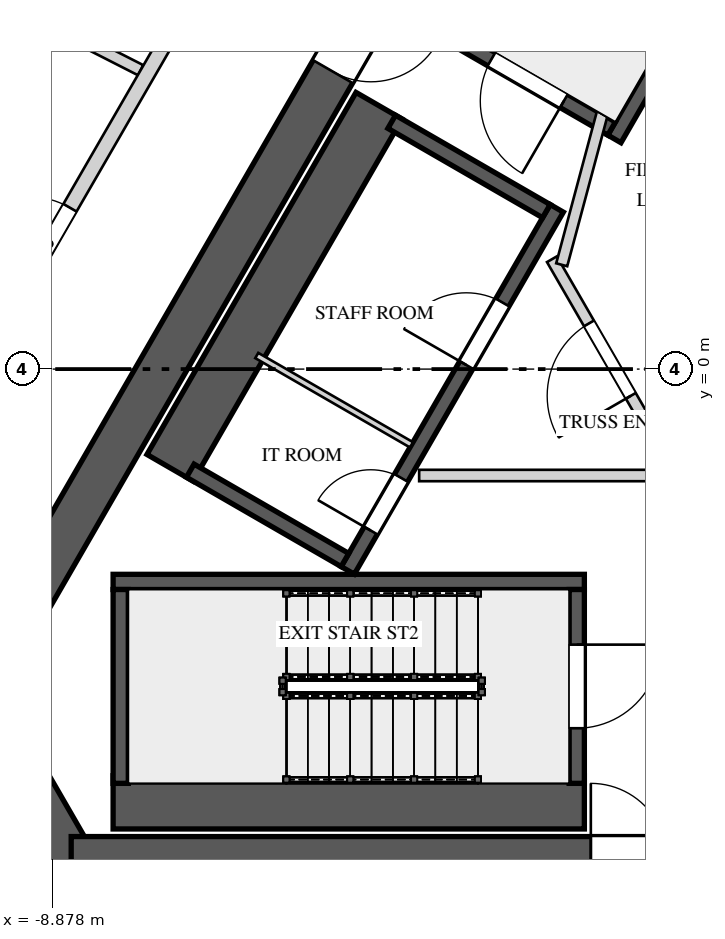
"""IFC4 building model, lengths in metres.
Left out: names, types, materials, properties, quantities, classifications, styles, units other than length and angle.
Written with IfcOpenShell. Run it as: python <this file> out.ifc"""

import sys

from ifc_helpers import new_model, si_unit, direction, frame, frame_2d, origin, place, context, subcontext, project, spatial, rectangle, extrude, element, fill, save


model = new_model("IFC4")
c1 = context("Model", 3, precision=1e-05, world=origin(), true_north=direction((0.0, 1.0)))
c2 = subcontext(c1, "Body", "Model", "MODEL_VIEW")
j1 = project(units=[si_unit("LENGTHUNIT", "METRE"), si_unit("PLANEANGLEUNIT", "RADIAN")], contexts=[c1])
p1 = place(None, origin())
s1 = spatial("IfcSite", under=j1, at=p1, CompositionType="ELEMENT")
p2 = place(p1, origin())
s2 = spatial("IfcBuilding", under=s1, at=p2, CompositionType="ELEMENT")
p3 = place(p2, frame((0.0, 0.0, 306.4)))
s3 = spatial("IfcBuildingStorey", under=s2, at=p3, CompositionType="ELEMENT", Elevation=306.4)
p4 = place(p3, frame((-1.27, 10.7, 0.0), z_axis=(0.0, 0.0, 1.0), x_axis=(-0.499999536116, -0.866025671608, 0.0)))
e1 = element("IfcWall", 1, at=p4, inside=s3, PredefinedType="SHEAR", context=c2, shape_type="SweptSolid", body=[
    extrude(rectangle(XDim=17.263, YDim=0.6, at=frame_2d((8.631, 0.0))), origin(), (0.0, 0.0, 1.0), 14.0),
])
p5 = place(p4, frame((6.836, 0.0, 0.0)))
e2 = element("IfcOpeningElement", 2, at=p5, cuts=e1, PredefinedType="OPENING", context=c2, shape_type="SweptSolid", body=[
    extrude(rectangle(XDim=1.0, YDim=2.4, at=frame_2d((0.5, 1.2))), frame((0.0, 0.31, 0.0), z_axis=(0.0, -1.0, 0.0), x_axis=(1.0, 0.0, 0.0)), (0.0, 0.0, 1.0), 0.62),
])
p6 = place(p3, frame((-9.988, -4.1, 0.0), z_axis=(0.0, 0.0, 1.0), x_axis=(0.499995765644, -0.866027848477, 0.0)))
e3 = element("IfcWall", 3, at=p6, inside=s3, PredefinedType="SHEAR", context=c2, shape_type="SweptSolid", body=[
    extrude(rectangle(XDim=2.887, YDim=0.6, at=frame_2d((1.443, 0.0))), origin(), (0.0, 0.0, 1.0), 14.0),
])
p7 = place(p3, frame((-8.631, -6.45, 0.0), z_axis=(0.0, 0.0, 1.0), x_axis=(1.0, 0.0, 0.0)))
e4 = element("IfcWall", 4, at=p7, inside=s3, PredefinedType="SHEAR", context=c2, shape_type="SweptSolid", body=[
    extrude(rectangle(XDim=17.263, YDim=0.6, at=frame_2d((8.631, 0.0))), origin(), (0.0, 0.0, 1.0), 14.0),
])
p8 = place(p7, frame((6.836, 0.0, 0.0)))
e5 = element("IfcOpeningElement", 5, at=p8, cuts=e4, PredefinedType="OPENING", context=c2, shape_type="SweptSolid", body=[
    extrude(rectangle(XDim=1.0, YDim=2.4, at=frame_2d((0.5, 1.2))), frame((0.0, 0.31, 0.0), z_axis=(0.0, -1.0, 0.0), x_axis=(1.0, 0.0, 0.0)), (0.0, 0.0, 1.0), 0.62),
])
p9 = place(p7, frame((15.034, 0.0, 0.0)))
e6 = element("IfcOpeningElement", 6, at=p9, cuts=e4, PredefinedType="OPENING", context=c2, shape_type="SweptSolid", body=[
    extrude(rectangle(XDim=0.8, YDim=2.1, at=frame_2d((0.4, 1.05))), frame((0.0, 0.31, 0.0), z_axis=(0.0, -1.0, 0.0), x_axis=(1.0, 0.0, 0.0)), (0.0, 0.0, 1.0), 0.62),
])
p10 = place(p3, frame((1.615, 8.397, 0.0), z_axis=(0.0, 0.0, 1.0), x_axis=(-0.500009909098, -0.866019682689, 0.0)))
e7 = element("IfcWall", 7, at=p10, inside=s3, PredefinedType="SOLIDWALL", context=c2, shape_type="SweptSolid", body=[
    extrude(rectangle(XDim=6.2, YDim=0.2, at=frame_2d((3.1, 0.0))), origin(), (0.0, 0.0, 1.0), 13.65),
])
p11 = place(p3, frame((-1.521, 3.165, 0.0), z_axis=(0.0, 0.0, 1.0), x_axis=(-0.866030925526, 0.499990435942, 0.0)))
e8 = element("IfcWall", 8, at=p11, inside=s3, PredefinedType="SOLIDWALL", context=c2, shape_type="SweptSolid", body=[
    extrude(rectangle(XDim=2.55, YDim=0.2, at=frame_2d((1.275, 0.0))), origin(), (0.0, 0.0, 1.0), 13.65),
])
p12 = place(p11, frame((0.725, 0.0, 0.0)))
e9 = element("IfcOpeningElement", 9, at=p12, cuts=e8, PredefinedType="OPENING", context=c2, shape_type="SweptSolid", body=[
    extrude(rectangle(XDim=1.1, YDim=2.4, at=frame_2d((0.55, 1.2))), frame((0.0, 0.11, 0.0), z_axis=(0.0, -1.0, 0.0), x_axis=(1.0, 0.0, 0.0)), (0.0, 0.0, 1.0), 0.22),
])
p13 = place(p3, frame((-8.08, -5.7, 0.0), z_axis=(0.0, 0.0, 1.0), x_axis=(1.0, 0.0, 0.0)))
e10 = element("IfcWall", 10, at=p13, inside=s3, PredefinedType="SOLIDWALL", context=c2, shape_type="SweptSolid", body=[
    extrude(rectangle(XDim=6.2, YDim=0.7, at=frame_2d((3.1, 0.0))), origin(), (0.0, 0.0, 1.0), 13.65),
])
p14 = place(p3, frame((-8.08, -2.8, 0.0), z_axis=(0.0, 0.0, 1.0), x_axis=(1.0, 0.0, 0.0)))
e11 = element("IfcWall", 11, at=p14, inside=s3, PredefinedType="SOLIDWALL", context=c2, shape_type="SweptSolid", body=[
    extrude(rectangle(XDim=6.2, YDim=0.2, at=frame_2d((3.1, 0.0))), origin(), (0.0, 0.0, 1.0), 13.65),
])
p15 = place(p3, frame((-7.98, -2.9, 0.0), z_axis=(0.0, 0.0, 1.0), x_axis=(0.0, -1.0, 0.0)))
e12 = element("IfcWall", 12, at=p15, inside=s3, PredefinedType="SOLIDWALL", context=c2, shape_type="SweptSolid", body=[
    extrude(rectangle(XDim=2.55, YDim=0.2, at=frame_2d((1.275, 0.0))), origin(), (0.0, 0.0, 1.0), 13.65),
])
p16 = place(p3, frame((-1.98, -2.9, 0.0), z_axis=(0.0, 0.0, 1.0), x_axis=(0.0, -1.0, 0.0)))
e13 = element("IfcWall", 13, at=p16, inside=s3, PredefinedType="SOLIDWALL", context=c2, shape_type="SweptSolid", body=[
    extrude(rectangle(XDim=2.55, YDim=0.2, at=frame_2d((1.275, 0.0))), origin(), (0.0, 0.0, 1.0), 13.65),
])
p17 = place(p16, frame((0.725, 0.0, 0.0)))
e14 = element("IfcOpeningElement", 14, at=p17, cuts=e13, PredefinedType="OPENING", context=c2, shape_type="SweptSolid", body=[
    extrude(rectangle(XDim=1.1, YDim=2.4, at=frame_2d((0.55, 1.2))), frame((0.0, 0.11, 0.0), z_axis=(0.0, -1.0, 0.0), x_axis=(1.0, 0.0, 0.0)), (0.0, 0.0, 1.0), 0.22),
])
p18 = place(p3, frame((-4.993, -2.648, 0.0), z_axis=(0.0, 0.0, 1.0), x_axis=(0.499996545922, 0.866027397988, 0.0)))
e15 = element("IfcWall", 15, at=p18, inside=s3, PredefinedType="SOLIDWALL", context=c2, shape_type="SweptSolid", body=[
    extrude(rectangle(XDim=5.5, YDim=0.2, at=frame_2d((2.75, 0.0))), origin(), (0.0, 0.0, 1.0), 13.65),
])
p19 = place(p18, frame((3.12, 0.0, 0.0)))
e16 = element("IfcOpeningElement", 16, at=p19, cuts=e15, PredefinedType="OPENING", context=c2, shape_type="SweptSolid", body=[
    extrude(rectangle(XDim=0.95, YDim=2.4, at=frame_2d((0.475, 1.2))), frame((0.0, 0.11, 0.0), z_axis=(0.0, -1.0, 0.0), x_axis=(1.0, 0.0, 0.0)), (0.0, 0.0, 1.0), 0.22),
])
p20 = place(p18, frame((0.605, 0.0, 0.0)))
e17 = element("IfcOpeningElement", 17, at=p20, cuts=e15, PredefinedType="OPENING", context=c2, shape_type="SweptSolid", body=[
    extrude(rectangle(XDim=0.8, YDim=2.1, at=frame_2d((0.4, 1.05))), frame((0.0, 0.11, 0.0), z_axis=(0.0, -1.0, 0.0), x_axis=(1.0, 0.0, 0.0)), (0.0, 0.0, 1.0), 0.22),
])
p21 = place(p3, frame((-4.581, 3.465, 0.0), z_axis=(0.0, 0.0, 1.0), x_axis=(-0.499996545922, -0.866027397988, 0.0)))
e18 = element("IfcWall", 18, at=p21, inside=s3, PredefinedType="SOLIDWALL", context=c2, shape_type="SweptSolid", body=[
    extrude(rectangle(XDim=5.5, YDim=0.7, at=frame_2d((2.75, 0.0))), origin(), (0.0, 0.0, 1.0), 13.65),
])
p22 = place(p3, frame((-2.38, 2.078, 0.0), z_axis=(0.0, 0.0, 1.0), x_axis=(-0.866061024631, 0.499938297808, 0.0)))
e19 = element("IfcWall", 19, at=p22, inside=s3, PredefinedType="SOLIDWALL", context=c2, shape_type="SweptSolid", body=[
    extrude(rectangle(XDim=2.35, YDim=0.2, at=frame_2d((1.175, 0.0))), origin(), (0.0, 0.0, 1.0), 13.65),
])
p23 = place(p3, frame((-5.03, -2.512, 0.0), z_axis=(0.0, 0.0, 1.0), x_axis=(-0.866016039709, 0.500016218704, 0.0)))
e20 = element("IfcWall", 20, at=p23, inside=s3, PredefinedType="SOLIDWALL", context=c2, shape_type="SweptSolid", body=[
    extrude(rectangle(XDim=2.35, YDim=0.2, at=frame_2d((1.175, 0.0))), origin(), (0.0, 0.0, 1.0), 13.65),
])
p24 = place(p3, frame((-4.155, -0.996, 0.0), z_axis=(0.0, 0.0, 1.0), x_axis=(-0.866016039709, 0.500016218704, 0.0)))
e21 = element("IfcWall", 21, at=p24, inside=s3, PredefinedType="PARTITIONING", context=c2, shape_type="SweptSolid", body=[
    extrude(rectangle(XDim=2.35, YDim=0.08, at=frame_2d((1.175, 0.0))), origin(), (0.0, 0.0, 1.0), 13.65),
])
p25 = place(p3, frame((-0.744, -1.261, 0.0), z_axis=(0.0, 0.0, 1.0), x_axis=(-0.500004234368, 0.866022959057, 0.0)))
e22 = element("IfcWall", 22, at=p25, inside=s3, PredefinedType="PARTITIONING", context=c2, shape_type="SweptSolid", body=[
    extrude(rectangle(XDim=3.125, YDim=0.15, at=frame_2d((1.562, 0.0))), origin(), (0.0, 0.0, 1.0), 13.65),
])
p26 = place(p25, frame((1.05, 0.0, 0.0)))
e23 = element("IfcOpeningElement", 23, at=p26, cuts=e22, PredefinedType="OPENING", context=c2, shape_type="SweptSolid", body=[
    extrude(rectangle(XDim=1.1, YDim=2.4, at=frame_2d((0.55, 1.2))), frame((0.0, 0.085, 0.0), z_axis=(0.0, -1.0, 0.0), x_axis=(1.0, 0.0, 0.0)), (0.0, 0.0, 1.0), 0.17),
])
p27 = place(p3, frame((-2.178, 1.372, 0.0), z_axis=(0.0, 0.0, 1.0), x_axis=(0.258808958833, 0.96592852884, 0.0)))
e24 = element("IfcWall", 24, at=p27, inside=s3, PredefinedType="PARTITIONING", context=c2, shape_type="SweptSolid", body=[
    extrude(rectangle(XDim=2.903, YDim=0.15, at=frame_2d((1.451, 0.0))), origin(), (0.0, 0.0, 1.0), 13.65),
])
p28 = place(p3, frame((-1.51, 4.215, 0.0), z_axis=(0.0, 0.0, 1.0), x_axis=(0.866085525409, 0.49989585183, 0.0)))
e25 = element("IfcWall", 25, at=p28, inside=s3, PredefinedType="PARTITIONING", context=c2, shape_type="SweptSolid", body=[
    extrude(rectangle(XDim=1.3, YDim=0.15, at=frame_2d((0.65, 0.0))), origin(), (0.0, 0.0, 1.0), 13.65),
])
p29 = place(p3, frame((-4.053, -1.4, 0.0), z_axis=(0.0, 0.0, 1.0), x_axis=(1.0, 0.0, 0.0)))
e26 = element("IfcWall", 26, at=p29, inside=s3, PredefinedType="PARTITIONING", context=c2, shape_type="SweptSolid", body=[
    extrude(rectangle(XDim=7.876, YDim=0.15, at=frame_2d((3.938, 0.0))), origin(), (0.0, 0.0, 1.0), 13.65),
])
p30 = place(p3, frame((-7.718, 3.932, 0.0), z_axis=(0.0, 0.0, 1.0), x_axis=(-0.891006469539, 0.453990606995, 0.0)))
e27 = element("IfcWall", 27, at=p30, inside=s3, PredefinedType="PARTITIONING", context=c2, shape_type="SweptSolid", body=[
    extrude(rectangle(XDim=8.011, YDim=0.15, at=frame_2d((4.005, 0.0))), origin(), (0.0, 0.0, 1.0), 13.65),
])
p31 = place(p3, frame((-9.819, 0.094, 0.0), z_axis=(0.0, 0.0, 1.0), x_axis=(0.499971228071, 0.866042014628, 0.0)))
e28 = element("IfcWall", 28, at=p31, inside=s3, PredefinedType="SOLIDWALL", context=c2, shape_type="SweptSolid", body=[
    extrude(rectangle(XDim=5.55, YDim=0.2, at=frame_2d((2.775, 0.0))), origin(), (0.0, 0.0, 1.0), 13.65),
])
p32 = place(p31, frame((1.243, 0.0, 0.0)))
e29 = element("IfcOpeningElement", 29, at=p32, cuts=e28, PredefinedType="OPENING", context=c2, shape_type="SweptSolid", body=[
    extrude(rectangle(XDim=1.1, YDim=2.2, at=frame_2d((0.55, 1.1))), frame((0.0, 0.11, 0.0), z_axis=(0.0, -1.0, 0.0), x_axis=(1.0, 0.0, 0.0)), (0.0, 0.0, 1.0), 0.22),
])
p33 = place(p12, origin())
e30 = element("IfcDoor", 30, at=p33, inside=s3, OperationType="SINGLE_SWING_RIGHT", PredefinedType="DOOR", context=c2, shape_type="SweptSolid", body=[
    extrude(rectangle(XDim=1.1, YDim=2.4, at=frame_2d((0.55, 1.2))), frame((0.0, 0.025, 0.0), z_axis=(0.0, -1.0, 0.0), x_axis=(1.0, 0.0, 0.0)), (0.0, 0.0, 1.0), 0.05),
])
fill(e9, e30)
p34 = place(p17, origin())
e31 = element("IfcDoor", 31, at=p34, inside=s3, OperationType="SINGLE_SWING_LEFT", PredefinedType="DOOR", context=c2, shape_type="SweptSolid", body=[
    extrude(rectangle(XDim=1.1, YDim=2.4, at=frame_2d((0.55, 1.2))), frame((0.0, 0.025, 0.0), z_axis=(0.0, -1.0, 0.0), x_axis=(1.0, 0.0, 0.0)), (0.0, 0.0, 1.0), 0.05),
])
fill(e14, e31)
p35 = place(p19, origin())
e32 = element("IfcDoor", 32, at=p35, inside=s3, OperationType="SINGLE_SWING_LEFT", PredefinedType="DOOR", context=c2, shape_type="SweptSolid", body=[
    extrude(rectangle(XDim=0.95, YDim=2.4, at=frame_2d((0.475, 1.2))), frame((0.0, 0.025, 0.0), z_axis=(0.0, -1.0, 0.0), x_axis=(1.0, 0.0, 0.0)), (0.0, 0.0, 1.0), 0.05),
])
fill(e16, e32)
p36 = place(p20, origin())
e33 = element("IfcDoor", 33, at=p36, inside=s3, OperationType="SINGLE_SWING_RIGHT", PredefinedType="DOOR", context=c2, shape_type="SweptSolid", body=[
    extrude(rectangle(XDim=0.8, YDim=2.1, at=frame_2d((0.4, 1.05))), frame((0.0, 0.025, 0.0), z_axis=(0.0, -1.0, 0.0), x_axis=(1.0, 0.0, 0.0)), (0.0, 0.0, 1.0), 0.05),
])
fill(e17, e33)
p37 = place(p26, origin())
e34 = element("IfcDoor", 34, at=p37, inside=s3, OperationType="SINGLE_SWING_LEFT", PredefinedType="DOOR", context=c2, shape_type="SweptSolid", body=[
    extrude(rectangle(XDim=1.1, YDim=2.4, at=frame_2d((0.55, 1.2))), frame((0.0, 0.025, 0.0), z_axis=(0.0, -1.0, 0.0), x_axis=(1.0, 0.0, 0.0)), (0.0, 0.0, 1.0), 0.05),
])
fill(e23, e34)
p38 = place(p5, origin())
e35 = element("IfcDoor", 35, at=p38, inside=s3, OperationType="SINGLE_SWING_RIGHT", PredefinedType="DOOR", context=c2, shape_type="SweptSolid", body=[
    extrude(rectangle(XDim=1.0, YDim=2.4, at=frame_2d((0.5, 1.2))), frame((0.0, 0.025, 0.0), z_axis=(0.0, -1.0, 0.0), x_axis=(1.0, 0.0, 0.0)), (0.0, 0.0, 1.0), 0.05),
])
fill(e2, e35)
p39 = place(p8, origin())
e36 = element("IfcDoor", 36, at=p39, inside=s3, OperationType="SINGLE_SWING_LEFT", PredefinedType="DOOR", context=c2, shape_type="SweptSolid", body=[
    extrude(rectangle(XDim=1.0, YDim=2.4, at=frame_2d((0.5, 1.2))), frame((0.0, 0.025, 0.0), z_axis=(0.0, -1.0, 0.0), x_axis=(1.0, 0.0, 0.0)), (0.0, 0.0, 1.0), 0.05),
])
fill(e5, e36)
p40 = place(p32, origin())
e37 = element("IfcDoor", 37, at=p40, inside=s3, OperationType="SINGLE_SWING_LEFT", PredefinedType="DOOR", context=c2, shape_type="SweptSolid", body=[
    extrude(rectangle(XDim=1.1, YDim=2.2, at=frame_2d((0.55, 1.1))), frame((0.0, 0.025, 0.0), z_axis=(0.0, -1.0, 0.0), x_axis=(1.0, 0.0, 0.0)), (0.0, 0.0, 1.0), 0.05),
])
fill(e29, e37)
save(model, sys.argv[1])
